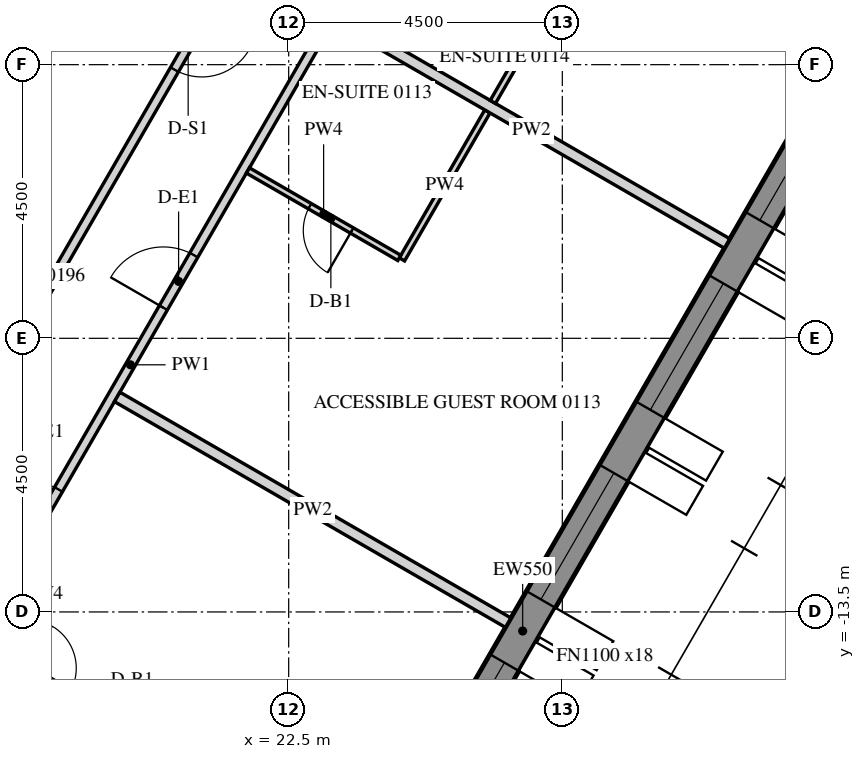
"""IFC4 building model, lengths in metres.
Left out: names, types, materials, properties, quantities, classifications, styles, units other than length and angle.
Written with IfcOpenShell. Run it as: python <this file> out.ifc"""

import sys

from ifc_helpers import new_model, si_unit, direction, frame, frame_2d, origin, place, context, subcontext, project, spatial, polyline, rectangle, outline, extrude, element, fill, save


model = new_model("IFC4")
c1 = context("Model", 3, precision=1e-05, world=origin(), true_north=direction((0.0, 1.0)))
c2 = subcontext(c1, "Body", "Model", "MODEL_VIEW")
j1 = project(units=[si_unit("LENGTHUNIT", "METRE"), si_unit("PLANEANGLEUNIT", "RADIAN")], contexts=[c1])
p1 = place(None, origin())
s1 = spatial("IfcSite", under=j1, at=p1, CompositionType="ELEMENT")
p2 = place(p1, origin())
s2 = spatial("IfcBuilding", under=s1, at=p2, CompositionType="ELEMENT")
p3 = place(p2, frame((0.0, 0.0, 37.5)))
s3 = spatial("IfcBuildingStorey", under=s2, at=p3, CompositionType="ELEMENT", Elevation=37.5)
p4 = place(p3, frame((18.83, -26.835, -0.15), z_axis=(0.0, 0.0, 1.0), x_axis=(0.500003800416, 0.866023209602, 0.0)))
e1 = element("IfcWall", 1, at=p4, inside=s3, PredefinedType="SOLIDWALL", context=c2, shape_type="SweptSolid", body=[
    extrude(outline(polyline([(-0.022, -0.275), (30.097, -0.275), (30.045, 0.275), (0.022, 0.275), (-0.022, -0.275)])), origin(), (0.0, 0.0, 1.0), 3.9),
])
p5 = place(p4, frame((1.236, 0.0, 1.05)))
e2 = element("IfcOpeningElement", 2, at=p5, cuts=e1, PredefinedType="OPENING", context=c2, shape_type="SweptSolid", body=[
    extrude(rectangle(XDim=2.4, YDim=2.4, at=frame_2d((1.2, 1.2))), frame((0.0, 0.285, 0.0), z_axis=(0.0, -1.0, 0.0), x_axis=(1.0, 0.0, 0.0)), (0.0, 0.0, 1.0), 0.57),
])
p6 = place(p4, frame((4.835, 0.0, 1.05)))
e3 = element("IfcOpeningElement", 3, at=p6, cuts=e1, PredefinedType="OPENING", context=c2, shape_type="SweptSolid", body=[
    extrude(rectangle(XDim=2.4, YDim=2.4, at=frame_2d((1.2, 1.2))), frame((0.0, 0.285, 0.0), z_axis=(0.0, -1.0, 0.0), x_axis=(1.0, 0.0, 0.0)), (0.0, 0.0, 1.0), 0.57),
])
p7 = place(p4, frame((8.436, 0.0, 1.05)))
e4 = element("IfcOpeningElement", 4, at=p7, cuts=e1, PredefinedType="OPENING", context=c2, shape_type="SweptSolid", body=[
    extrude(rectangle(XDim=2.4, YDim=2.4, at=frame_2d((1.2, 1.2))), frame((0.0, 0.285, 0.0), z_axis=(0.0, -1.0, 0.0), x_axis=(1.0, 0.0, 0.0)), (0.0, 0.0, 1.0), 0.57),
])
p8 = place(p4, frame((12.035, 0.0, 1.05)))
e5 = element("IfcOpeningElement", 5, at=p8, cuts=e1, PredefinedType="OPENING", context=c2, shape_type="SweptSolid", body=[
    extrude(rectangle(XDim=2.4, YDim=2.4, at=frame_2d((1.2, 1.2))), frame((0.0, 0.285, 0.0), z_axis=(0.0, -1.0, 0.0), x_axis=(1.0, 0.0, 0.0)), (0.0, 0.0, 1.0), 0.57),
])
p9 = place(p4, frame((15.635, 0.0, 1.05)))
e6 = element("IfcOpeningElement", 6, at=p9, cuts=e1, PredefinedType="OPENING", context=c2, shape_type="SweptSolid", body=[
    extrude(rectangle(XDim=2.4, YDim=2.4, at=frame_2d((1.2, 1.2))), frame((0.0, 0.285, 0.0), z_axis=(0.0, -1.0, 0.0), x_axis=(1.0, 0.0, 0.0)), (0.0, 0.0, 1.0), 0.57),
])
p10 = place(p4, frame((19.236, 0.0, 1.05)))
e7 = element("IfcOpeningElement", 7, at=p10, cuts=e1, PredefinedType="OPENING", context=c2, shape_type="SweptSolid", body=[
    extrude(rectangle(XDim=2.4, YDim=2.4, at=frame_2d((1.2, 1.2))), frame((0.0, 0.285, 0.0), z_axis=(0.0, -1.0, 0.0), x_axis=(1.0, 0.0, 0.0)), (0.0, 0.0, 1.0), 0.57),
])
p11 = place(p4, frame((22.835, 0.0, 1.05)))
e8 = element("IfcOpeningElement", 8, at=p11, cuts=e1, PredefinedType="OPENING", context=c2, shape_type="SweptSolid", body=[
    extrude(rectangle(XDim=2.4, YDim=2.4, at=frame_2d((1.2, 1.2))), frame((0.0, 0.285, 0.0), z_axis=(0.0, -1.0, 0.0), x_axis=(1.0, 0.0, 0.0)), (0.0, 0.0, 1.0), 0.57),
])
p12 = place(p4, frame((26.436, 0.0, 1.05)))
e9 = element("IfcOpeningElement", 9, at=p12, cuts=e1, PredefinedType="OPENING", context=c2, shape_type="SweptSolid", body=[
    extrude(rectangle(XDim=2.4, YDim=2.4, at=frame_2d((1.2, 1.2))), frame((0.0, 0.285, 0.0), z_axis=(0.0, -1.0, 0.0), x_axis=(1.0, 0.0, 0.0)), (0.0, 0.0, 1.0), 0.57),
])
p13 = place(p3, frame((13.928, -19.775, 0.0), z_axis=(0.0, 0.0, 1.0), x_axis=(0.50000450071, 0.866022805283, 0.0)))
e10 = element("IfcWall", 10, at=p13, inside=s3, PredefinedType="PARTITIONING", context=c2, shape_type="SweptSolid", body=[
    extrude(rectangle(XDim=23.877, YDim=0.15, at=frame_2d((11.938, 0.0))), origin(), (0.0, 0.0, 1.0), 2.988),
])
p14 = place(p13, frame((8.573, 0.0, 0.0)))
e11 = element("IfcOpeningElement", 11, at=p14, cuts=e10, PredefinedType="OPENING", context=c2, shape_type="SweptSolid", body=[
    extrude(rectangle(XDim=1.0, YDim=2.1, at=frame_2d((0.5, 1.05))), frame((0.0, 0.085, 0.0), z_axis=(0.0, -1.0, 0.0), x_axis=(1.0, 0.0, 0.0)), (0.0, 0.0, 1.0), 0.17),
])
p15 = place(p13, frame((13.022, 0.0, 0.0)))
e12 = element("IfcOpeningElement", 12, at=p15, cuts=e10, PredefinedType="OPENING", context=c2, shape_type="SweptSolid", body=[
    extrude(rectangle(XDim=1.0, YDim=2.1, at=frame_2d((0.5, 1.05))), frame((0.0, 0.085, 0.0), z_axis=(0.0, -1.0, 0.0), x_axis=(1.0, 0.0, 0.0)), (0.0, 0.0, 1.0), 0.17),
])
p16 = place(p13, frame((21.925, 0.0, 0.0)))
e13 = element("IfcOpeningElement", 13, at=p16, cuts=e10, PredefinedType="OPENING", context=c2, shape_type="SweptSolid", body=[
    extrude(rectangle(XDim=1.0, YDim=2.1, at=frame_2d((0.5, 1.05))), frame((0.0, 0.085, 0.0), z_axis=(0.0, -1.0, 0.0), x_axis=(1.0, 0.0, 0.0)), (0.0, 0.0, 1.0), 0.17),
])
p17 = place(p3, frame((23.704, 0.757, 0.0), z_axis=(0.0, 0.0, 1.0), x_axis=(-0.500010297365, -0.866019458516, 0.0)))
e14 = element("IfcWall", 14, at=p17, inside=s3, PredefinedType="PARTITIONING", context=c2, shape_type="SweptSolid", body=[
    extrude(rectangle(XDim=11.429, YDim=0.15, at=frame_2d((5.714, 0.0))), origin(), (0.0, 0.0, 1.0), 2.988),
])
p18 = place(p17, frame((5.264, 0.0, 0.0)))
e15 = element("IfcOpeningElement", 15, at=p18, cuts=e14, PredefinedType="OPENING", context=c2, shape_type="SweptSolid", body=[
    extrude(rectangle(XDim=0.9, YDim=2.1, at=frame_2d((0.45, 1.05))), frame((0.0, 0.085, 0.0), z_axis=(0.0, -1.0, 0.0), x_axis=(1.0, 0.0, 0.0)), (0.0, 0.0, 1.0), 0.17),
])
p19 = place(p3, frame((17.38, -13.948, 0.0), z_axis=(0.0, 0.0, 1.0), x_axis=(0.866039067339, -0.499976333282, 0.0)))
e16 = element("IfcWall", 16, at=p19, inside=s3, PredefinedType="PARTITIONING", context=c2, shape_type="SweptSolid", body=[
    extrude(rectangle(XDim=2.525, YDim=0.1, at=frame_2d((1.262, 0.0))), origin(), (0.0, 0.0, 1.0), 2.988),
])
p20 = place(p19, frame((0.955, 0.0, 0.0)))
e17 = element("IfcOpeningElement", 17, at=p20, cuts=e16, PredefinedType="OPENING", context=c2, shape_type="SweptSolid", body=[
    extrude(rectangle(XDim=0.8, YDim=2.1, at=frame_2d((0.4, 1.05))), frame((0.0, 0.06, 0.0), z_axis=(0.0, -1.0, 0.0), x_axis=(1.0, 0.0, 0.0)), (0.0, 0.0, 1.0), 0.12),
])
p21 = place(p3, frame((26.11, -13.676, 0.0), z_axis=(0.0, 0.0, 1.0), x_axis=(-0.866014745021, 0.500018461065, 0.0)))
e18 = element("IfcWall", 18, at=p21, inside=s3, PredefinedType="PARTITIONING", context=c2, shape_type="SweptSolid", body=[
    extrude(rectangle(XDim=7.425, YDim=0.18, at=frame_2d((3.712, 0.0))), origin(), (0.0, 0.0, 1.0), 2.988),
])
p22 = place(p3, frame((25.768, -5.269, 0.0), z_axis=(0.0, 0.0, 1.0), x_axis=(-0.499998209175, -0.866026437715, 0.0)))
e19 = element("IfcWall", 19, at=p22, inside=s3, PredefinedType="PARTITIONING", context=c2, shape_type="SweptSolid", body=[
    extrude(rectangle(XDim=2.81, YDim=0.1, at=frame_2d((1.405, 0.0))), origin(), (0.0, 0.0, 1.0), 2.988),
])
p23 = place(p3, frame((24.32, -7.677, 0.0), z_axis=(0.0, 0.0, 1.0), x_axis=(-0.866018712932, 0.500011588718, 0.0)))
e20 = element("IfcWall", 20, at=p23, inside=s3, PredefinedType="PARTITIONING", context=c2, shape_type="SweptSolid", body=[
    extrude(rectangle(XDim=2.875, YDim=0.1, at=frame_2d((1.438, 0.0))), origin(), (0.0, 0.0, 1.0), 2.988),
])
p24 = place(p23, frame((0.9, 0.0, 0.0)))
e21 = element("IfcOpeningElement", 21, at=p24, cuts=e20, PredefinedType="OPENING", context=c2, shape_type="SweptSolid", body=[
    extrude(rectangle(XDim=0.8, YDim=2.1, at=frame_2d((0.4, 1.05))), frame((0.0, 0.06, 0.0), z_axis=(0.0, -1.0, 0.0), x_axis=(1.0, 0.0, 0.0)), (0.0, 0.0, 1.0), 0.12),
])
p25 = place(p3, frame((29.71, -7.441, 0.0), z_axis=(0.0, 0.0, 1.0), x_axis=(-0.866014745021, 0.500018461065, 0.0)))
e22 = element("IfcWall", 22, at=p25, inside=s3, PredefinedType="PARTITIONING", context=c2, shape_type="SweptSolid", body=[
    extrude(rectangle(XDim=7.425, YDim=0.18, at=frame_2d((3.712, 0.0))), origin(), (0.0, 0.0, 1.0), 2.988),
])
p26 = place(p3, frame((26.988, -3.156, 0.0), z_axis=(0.0, 0.0, 1.0), x_axis=(-0.4999967785, -0.866027263711, 0.0)))
e23 = element("IfcWall", 23, at=p26, inside=s3, PredefinedType="PARTITIONING", context=c2, shape_type="SweptSolid", body=[
    extrude(rectangle(XDim=2.26, YDim=0.1, at=frame_2d((1.13, 0.0))), origin(), (0.0, 0.0, 1.0), 2.988),
])
p27 = place(p8, frame((0.0, 0.205, 0.0)))
e24 = element("IfcWindow", 24, at=p27, inside=s3, PartitioningType="DOUBLE_PANEL_VERTICAL", PredefinedType="WINDOW", context=c2, shape_type="SweptSolid", body=[
    extrude(rectangle(XDim=2.4, YDim=2.4, at=frame_2d((1.2, 1.2))), frame((0.0, 0.03, 0.0), z_axis=(0.0, -1.0, 0.0), x_axis=(1.0, 0.0, 0.0)), (0.0, 0.0, 1.0), 0.06),
])
fill(e5, e24)
p28 = place(p9, frame((0.0, 0.205, 0.0)))
e25 = element("IfcWindow", 25, at=p28, inside=s3, PartitioningType="DOUBLE_PANEL_VERTICAL", PredefinedType="WINDOW", context=c2, shape_type="SweptSolid", body=[
    extrude(rectangle(XDim=2.4, YDim=2.4, at=frame_2d((1.2, 1.2))), frame((0.0, 0.03, 0.0), z_axis=(0.0, -1.0, 0.0), x_axis=(1.0, 0.0, 0.0)), (0.0, 0.0, 1.0), 0.06),
])
fill(e6, e25)
p29 = place(p10, frame((0.0, 0.205, 0.0)))
e26 = element("IfcWindow", 26, at=p29, inside=s3, PartitioningType="DOUBLE_PANEL_VERTICAL", PredefinedType="WINDOW", context=c2, shape_type="SweptSolid", body=[
    extrude(rectangle(XDim=2.4, YDim=2.4, at=frame_2d((1.2, 1.2))), frame((0.0, 0.03, 0.0), z_axis=(0.0, -1.0, 0.0), x_axis=(1.0, 0.0, 0.0)), (0.0, 0.0, 1.0), 0.06),
])
fill(e7, e26)
p30 = place(p11, frame((0.0, 0.205, 0.0)))
e27 = element("IfcWindow", 27, at=p30, inside=s3, PartitioningType="DOUBLE_PANEL_VERTICAL", PredefinedType="WINDOW", context=c2, shape_type="SweptSolid", body=[
    extrude(rectangle(XDim=2.4, YDim=2.4, at=frame_2d((1.2, 1.2))), frame((0.0, 0.03, 0.0), z_axis=(0.0, -1.0, 0.0), x_axis=(1.0, 0.0, 0.0)), (0.0, 0.0, 1.0), 0.06),
])
fill(e8, e27)
p31 = place(p14, origin())
e28 = element("IfcDoor", 28, at=p31, inside=s3, OperationType="SINGLE_SWING_LEFT", PredefinedType="DOOR", context=c2, shape_type="SweptSolid", body=[
    extrude(rectangle(XDim=1.0, YDim=2.1, at=frame_2d((0.5, 1.05))), frame((0.0, 0.025, 0.0), z_axis=(0.0, -1.0, 0.0), x_axis=(1.0, 0.0, 0.0)), (0.0, 0.0, 1.0), 0.05),
])
fill(e11, e28)
p32 = place(p20, origin())
e29 = element("IfcDoor", 29, at=p32, inside=s3, OperationType="SINGLE_SWING_LEFT", PredefinedType="DOOR", context=c2, shape_type="SweptSolid", body=[
    extrude(rectangle(XDim=0.8, YDim=2.1, at=frame_2d((0.4, 1.05))), frame((0.0, 0.025, 0.0), z_axis=(0.0, -1.0, 0.0), x_axis=(1.0, 0.0, 0.0)), (0.0, 0.0, 1.0), 0.05),
])
fill(e17, e29)
p33 = place(p15, origin())
e30 = element("IfcDoor", 30, at=p33, inside=s3, OperationType="SINGLE_SWING_RIGHT", PredefinedType="DOOR", context=c2, shape_type="SweptSolid", body=[
    extrude(rectangle(XDim=1.0, YDim=2.1, at=frame_2d((0.5, 1.05))), frame((0.0, 0.025, 0.0), z_axis=(0.0, -1.0, 0.0), x_axis=(1.0, 0.0, 0.0)), (0.0, 0.0, 1.0), 0.05),
])
fill(e12, e30)
p34 = place(p24, origin())
e31 = element("IfcDoor", 31, at=p34, inside=s3, OperationType="SINGLE_SWING_RIGHT", PredefinedType="DOOR", context=c2, shape_type="SweptSolid", body=[
    extrude(rectangle(XDim=0.8, YDim=2.1, at=frame_2d((0.4, 1.05))), frame((0.0, 0.025, 0.0), z_axis=(0.0, -1.0, 0.0), x_axis=(1.0, 0.0, 0.0)), (0.0, 0.0, 1.0), 0.05),
])
fill(e21, e31)
p35 = place(p18, origin())
e32 = element("IfcDoor", 32, at=p35, inside=s3, OperationType="SINGLE_SWING_LEFT", PredefinedType="DOOR", context=c2, shape_type="SweptSolid", body=[
    extrude(rectangle(XDim=0.9, YDim=2.1, at=frame_2d((0.45, 1.05))), frame((0.0, 0.025, 0.0), z_axis=(0.0, -1.0, 0.0), x_axis=(1.0, 0.0, 0.0)), (0.0, 0.0, 1.0), 0.05),
])
fill(e15, e32)
save(model, sys.argv[1])
